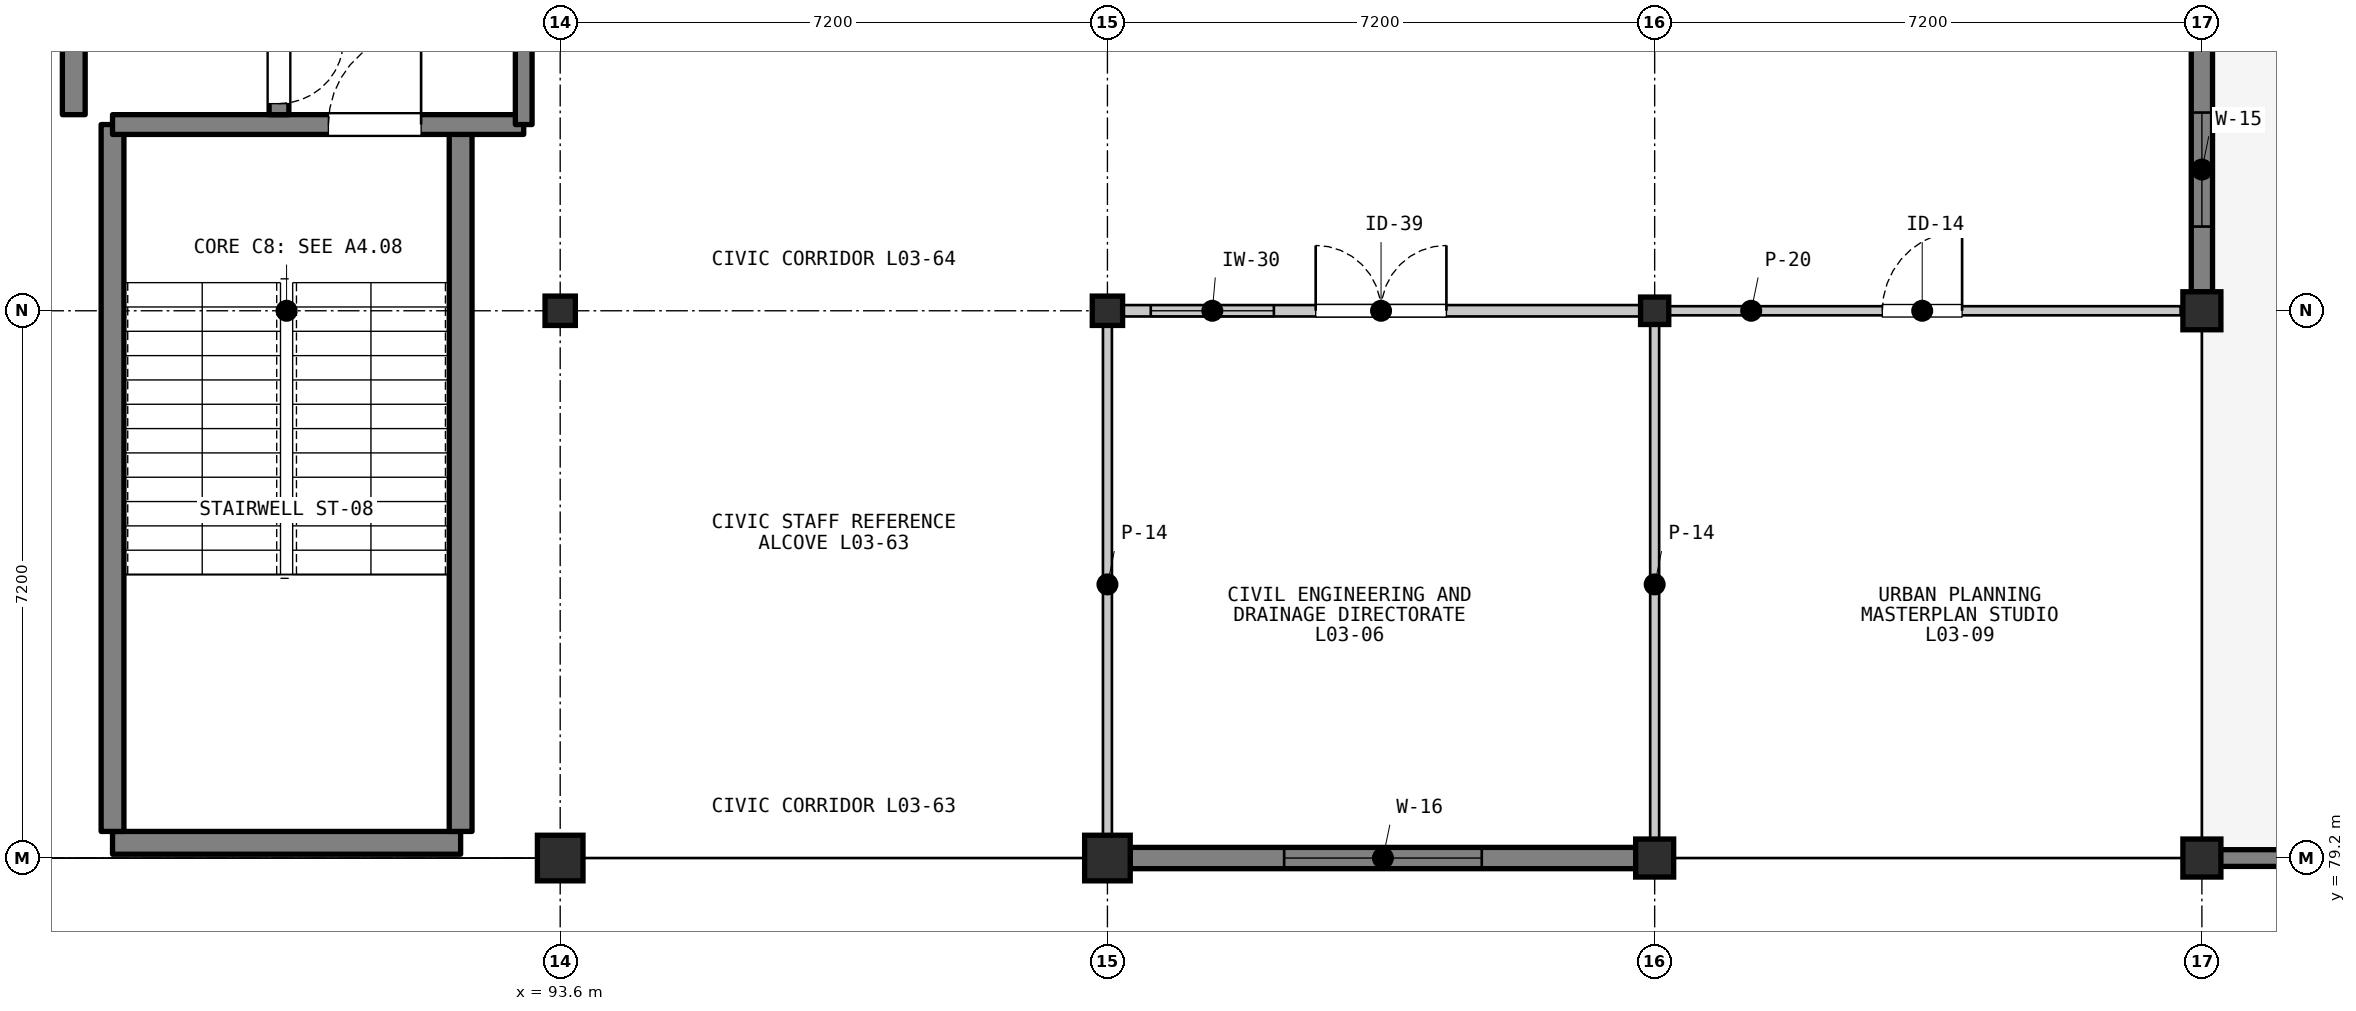
"""IFC4 building model, lengths in metres.
Left out: names, types, materials, properties, quantities, classifications, styles, units other than length and angle.
Written with IfcOpenShell. Run it as: python <this file> out.ifc"""

import sys

from ifc_helpers import new_model, si_unit, direction, frame, frame_2d, origin, origin_2d, place, context, subcontext, project, spatial, rectangle, i_section, extrude, element, fill, save


model = new_model("IFC4")
c1 = context("Model", 3, precision=1e-05, world=origin(), true_north=direction((0.0, 1.0)))
c2 = subcontext(c1, "Body", "Model", "MODEL_VIEW")
j1 = project(units=[si_unit("LENGTHUNIT", "METRE"), si_unit("PLANEANGLEUNIT", "RADIAN")], contexts=[c1])
p1 = place(None, origin())
s1 = spatial("IfcSite", under=j1, at=p1, CompositionType="ELEMENT")
p2 = place(p1, origin())
s2 = spatial("IfcBuilding", under=s1, at=p2, CompositionType="ELEMENT")
p3 = place(p2, frame((0.0, 0.0, 9.9)))
s3 = spatial("IfcBuildingStorey", under=s2, at=p3, CompositionType="ELEMENT", Elevation=9.9)
p4 = place(p3, frame((93.6, 79.2, 0.0), z_axis=(0.0, 0.0, 1.0), x_axis=(1.0, 0.0, 0.0)))
e1 = element("IfcColumn", 1, at=p4, inside=s3, PredefinedType="COLUMN", context=c2, shape_type="SweptSolid", body=[
    extrude(rectangle(XDim=0.6, YDim=0.6, at=origin_2d()), origin(), (0.0, 0.0, 1.0), 4.2),
])
p5 = place(p3, frame((93.6, 86.4, 0.0), z_axis=(0.0, 0.0, 1.0), x_axis=(1.0, 0.0, 0.0)))
e2 = element("IfcColumn", 2, at=p5, inside=s3, PredefinedType="COLUMN", context=c2, shape_type="SweptSolid", body=[
    extrude(i_section(OverallWidth=0.399, OverallDepth=0.386, WebThickness=0.021, FlangeThickness=0.033, FilletRadius=0.015, at=origin_2d()), origin(), (0.0, 0.0, 1.0), 4.2),
])
p6 = place(p3, frame((100.8, 79.2, 0.0), z_axis=(0.0, 0.0, 1.0), x_axis=(1.0, 0.0, 0.0)))
e3 = element("IfcColumn", 3, at=p6, inside=s3, PredefinedType="COLUMN", context=c2, shape_type="SweptSolid", body=[
    extrude(rectangle(XDim=0.6, YDim=0.6, at=origin_2d()), origin(), (0.0, 0.0, 1.0), 4.2),
])
p7 = place(p3, frame((100.8, 86.4, 0.0), z_axis=(0.0, 0.0, 1.0), x_axis=(1.0, 0.0, 0.0)))
e4 = element("IfcColumn", 4, at=p7, inside=s3, PredefinedType="COLUMN", context=c2, shape_type="SweptSolid", body=[
    extrude(i_section(OverallWidth=0.399, OverallDepth=0.386, WebThickness=0.021, FlangeThickness=0.033, FilletRadius=0.015, at=origin_2d()), origin(), (0.0, 0.0, 1.0), 4.2),
])
p8 = place(p3, frame((108.0, 79.2, 0.0), z_axis=(0.0, 0.0, 1.0), x_axis=(1.0, 0.0, 0.0)))
e5 = element("IfcColumn", 5, at=p8, inside=s3, PredefinedType="COLUMN", context=c2, shape_type="SweptSolid", body=[
    extrude(rectangle(XDim=0.5, YDim=0.5, at=origin_2d()), origin(), (0.0, 0.0, 1.0), 4.2),
])
p9 = place(p3, frame((108.0, 86.4, 0.0), z_axis=(0.0, 0.0, 1.0), x_axis=(1.0, 0.0, 0.0)))
e6 = element("IfcColumn", 6, at=p9, inside=s3, PredefinedType="COLUMN", context=c2, shape_type="SweptSolid", body=[
    extrude(i_section(OverallWidth=0.371, OverallDepth=0.361, WebThickness=0.012, FlangeThickness=0.02, FilletRadius=0.015, at=origin_2d()), origin(), (0.0, 0.0, 1.0), 4.2),
])
for number, where, z_axis, x_axis in (
    (7, (115.2, 79.2, 0.0), (0.0, 0.0, 1.0), (1.0, 0.0, 0.0)),
    (8, (115.2, 86.4, 0.0), (0.0, 0.0, 1.0), (1.0, 0.0, 0.0)),
):
    element("IfcColumn", number, at=place(p3, frame(where, z_axis=z_axis, x_axis=x_axis)), inside=s3, PredefinedType="COLUMN", context=c2, shape_type="SweptSolid", body=[
        extrude(rectangle(XDim=0.5, YDim=0.5, at=origin_2d()), origin(), (0.0, 0.0, 1.0), 4.2),
    ])
p10 = place(p3, frame((107.75, 79.2, 0.0), z_axis=(0.0, 0.0, 1.0), x_axis=(-1.0, 0.0, 0.0)))
e9 = element("IfcWall", 9, at=p10, inside=s3, PredefinedType="SOLIDWALL", context=c2, shape_type="SweptSolid", body=[
    extrude(rectangle(XDim=6.65, YDim=0.28, at=frame_2d((3.325, 0.0))), origin(), (0.0, 0.0, 1.0), 3.418),
])
p11 = place(p10, frame((2.025, 0.0, 0.95)))
e10 = element("IfcOpeningElement", 10, at=p11, cuts=e9, PredefinedType="OPENING", context=c2, shape_type="SweptSolid", body=[
    extrude(rectangle(XDim=2.6, YDim=1.9, at=frame_2d((1.3, 0.95))), frame((0.0, 0.15, 0.0), z_axis=(0.0, -1.0, 0.0), x_axis=(1.0, 0.0, 0.0)), (0.0, 0.0, 1.0), 0.3),
])
p12 = place(p3, frame((115.2, 93.35, 0.0), z_axis=(0.0, 0.0, 1.0), x_axis=(0.0, -1.0, 0.0)))
e11 = element("IfcWall", 11, at=p12, inside=s3, PredefinedType="SOLIDWALL", context=c2, shape_type="SweptSolid", body=[
    extrude(rectangle(XDim=6.7, YDim=0.28, at=frame_2d((3.35, 0.0))), origin(), (0.0, 0.0, 1.0), 3.467),
])
p13 = place(p12, frame((0.858, 0.0, 0.95)))
e12 = element("IfcOpeningElement", 12, at=p13, cuts=e11, PredefinedType="OPENING", context=c2, shape_type="SweptSolid", body=[
    extrude(rectangle(XDim=1.5, YDim=1.9, at=frame_2d((0.75, 0.95))), frame((0.0, 0.15, 0.0), z_axis=(0.0, -1.0, 0.0), x_axis=(1.0, 0.0, 0.0)), (0.0, 0.0, 1.0), 0.3),
])
p14 = place(p12, frame((4.342, 0.0, 0.95)))
e13 = element("IfcOpeningElement", 13, at=p14, cuts=e11, PredefinedType="OPENING", context=c2, shape_type="SweptSolid", body=[
    extrude(rectangle(XDim=1.5, YDim=1.9, at=frame_2d((0.75, 0.95))), frame((0.0, 0.15, 0.0), z_axis=(0.0, -1.0, 0.0), x_axis=(1.0, 0.0, 0.0)), (0.0, 0.0, 1.0), 0.3),
])
p15 = place(p3, frame((122.25, 79.2, 0.0), z_axis=(0.0, 0.0, 1.0), x_axis=(-1.0, 0.0, 0.0)))
e14 = element("IfcWall", 14, at=p15, inside=s3, PredefinedType="PARAPET", context=c2, shape_type="SweptSolid", body=[
    extrude(rectangle(XDim=6.9, YDim=0.22, at=frame_2d((3.45, 0.0))), origin(), (0.0, 0.0, 1.0), 0.85),
])
p16 = place(p3, frame((87.71, 79.4, 0.0), z_axis=(0.0, 0.0, 1.0), x_axis=(1.0, 0.0, 0.0)))
e15 = element("IfcWall", 15, at=p16, inside=s3, PredefinedType="SHEAR", context=c2, shape_type="SweptSolid", body=[
    extrude(rectangle(XDim=4.58, YDim=0.3, at=frame_2d((2.29, 0.0))), origin(), (0.0, 0.0, 1.0), 4.02),
])
for number, where, z_axis, x_axis in (
    (16, (87.71, 79.55, 0.0), (0.0, 0.0, 1.0), (0.0, 1.0, 0.0)),
    (17, (92.29, 79.55, 0.0), (0.0, 0.0, 1.0), (0.0, 1.0, 0.0)),
):
    element("IfcWall", number, at=place(p3, frame(where, z_axis=z_axis, x_axis=x_axis)), inside=s3, PredefinedType="SHEAR", context=c2, shape_type="SweptSolid", body=[
        extrude(rectangle(XDim=9.3, YDim=0.3, at=frame_2d((4.65, 0.0))), origin(), (0.0, 0.0, 1.0), 4.02),
    ])
p17 = place(p3, frame((87.71, 88.85, 0.0), z_axis=(0.0, 0.0, 1.0), x_axis=(1.0, 0.0, 0.0)))
e18 = element("IfcWall", 18, at=p17, inside=s3, PredefinedType="SHEAR", context=c2, shape_type="SweptSolid", body=[
    extrude(rectangle(XDim=5.41, YDim=0.26, at=frame_2d((2.705, 0.0))), origin(), (0.0, 0.0, 1.0), 4.02),
])
p18 = place(p17, frame((2.84, 0.0, 0.0)))
e19 = element("IfcOpeningElement", 19, at=p18, cuts=e18, PredefinedType="OPENING", context=c2, shape_type="SweptSolid", body=[
    extrude(rectangle(XDim=1.22, YDim=2.15, at=frame_2d((0.61, 1.075))), frame((0.0, 0.14, 0.0), z_axis=(0.0, -1.0, 0.0), x_axis=(1.0, 0.0, 0.0)), (0.0, 0.0, 1.0), 0.28),
])
p19 = place(p3, frame((87.2, 88.98, 0.0), z_axis=(0.0, 0.0, 1.0), x_axis=(0.0, 1.0, 0.0)))
e20 = element("IfcWall", 20, at=p19, inside=s3, PredefinedType="SHEAR", context=c2, shape_type="SweptSolid", body=[
    extrude(rectangle(XDim=4.32, YDim=0.3, at=frame_2d((2.16, 0.0))), origin(), (0.0, 0.0, 1.0), 4.02),
])
p20 = place(p3, frame((89.9, 93.3, 0.0), z_axis=(0.0, 0.0, 1.0), x_axis=(0.0, -1.0, 0.0)))
e21 = element("IfcWall", 21, at=p20, inside=s3, PredefinedType="SHEAR", context=c2, shape_type="SweptSolid", body=[
    extrude(rectangle(XDim=4.32, YDim=0.26, at=frame_2d((2.16, 0.0))), origin(), (0.0, 0.0, 1.0), 4.02),
])
p21 = place(p20, frame((1.0, 0.0, 0.0)))
e22 = element("IfcOpeningElement", 22, at=p21, cuts=e21, PredefinedType="OPENING", context=c2, shape_type="SweptSolid", body=[
    extrude(rectangle(XDim=1.2, YDim=2.15, at=frame_2d((0.6, 1.075))), frame((0.0, 0.14, 0.0), z_axis=(0.0, -1.0, 0.0), x_axis=(1.0, 0.0, 0.0)), (0.0, 0.0, 1.0), 0.28),
])
p22 = place(p20, frame((3.325, 0.0, 0.0)))
e23 = element("IfcOpeningElement", 23, at=p22, cuts=e21, PredefinedType="OPENING", context=c2, shape_type="SweptSolid", body=[
    extrude(rectangle(XDim=0.85, YDim=2.05, at=frame_2d((0.425, 1.025))), frame((0.0, 0.14, 0.0), z_axis=(0.0, -1.0, 0.0), x_axis=(1.0, 0.0, 0.0)), (0.0, 0.0, 1.0), 0.28),
])
p23 = place(p3, frame((93.12, 93.3, 0.0), z_axis=(0.0, 0.0, 1.0), x_axis=(0.0, -1.0, 0.0)))
e24 = element("IfcWall", 24, at=p23, inside=s3, PredefinedType="SHEAR", context=c2, shape_type="SweptSolid", body=[
    extrude(rectangle(XDim=4.45, YDim=0.22, at=frame_2d((2.225, 0.0))), origin(), (0.0, 0.0, 1.0), 4.02),
])
p24 = place(p23, frame((1.55, 0.0, 0.0)))
e25 = element("IfcOpeningElement", 25, at=p24, cuts=e24, PredefinedType="OPENING", context=c2, shape_type="SweptSolid", body=[
    extrude(rectangle(XDim=1.6, YDim=2.2, at=frame_2d((0.8, 1.1))), frame((0.0, 0.12, 0.0), z_axis=(0.0, -1.0, 0.0), x_axis=(1.0, 0.0, 0.0)), (0.0, 0.0, 1.0), 0.24),
])
p25 = place(p3, frame((100.92, 86.4, 0.0), z_axis=(0.0, 0.0, 1.0), x_axis=(1.0, 0.0, 0.0)))
e26 = element("IfcWall", 26, at=p25, inside=s3, PredefinedType="PARTITIONING", context=c2, shape_type="SweptSolid", body=[
    extrude(rectangle(XDim=6.96, YDim=0.15, at=frame_2d((3.48, 0.0))), origin(), (0.0, 0.0, 1.0), 3.408),
])
p26 = place(p25, frame((2.62, 0.0, 0.0)))
e27 = element("IfcOpeningElement", 27, at=p26, cuts=e26, PredefinedType="OPENING", context=c2, shape_type="SweptSolid", body=[
    extrude(rectangle(XDim=1.72, YDim=2.32, at=frame_2d((0.86, 1.16))), frame((0.0, 0.085, 0.0), z_axis=(0.0, -1.0, 0.0), x_axis=(1.0, 0.0, 0.0)), (0.0, 0.0, 1.0), 0.17),
])
p27 = place(p25, frame((0.45, 0.0, 1.05)))
e28 = element("IfcOpeningElement", 28, at=p27, cuts=e26, PredefinedType="OPENING", context=c2, shape_type="SweptSolid", body=[
    extrude(rectangle(XDim=1.62, YDim=0.96, at=frame_2d((0.81, 0.48))), frame((0.0, 0.085, 0.0), z_axis=(0.0, -1.0, 0.0), x_axis=(1.0, 0.0, 0.0)), (0.0, 0.0, 1.0), 0.17),
])
p28 = place(p3, frame((100.8, 79.32, 0.0), z_axis=(0.0, 0.0, 1.0), x_axis=(0.0, 1.0, 0.0)))
e29 = element("IfcWall", 29, at=p28, inside=s3, PredefinedType="PARTITIONING", context=c2, shape_type="SweptSolid", body=[
    extrude(rectangle(XDim=6.96, YDim=0.118, at=frame_2d((3.48, 0.0))), origin(), (0.0, 0.0, 1.0), 3.408),
])
p29 = place(p3, frame((108.0, 86.28, 0.0), z_axis=(0.0, 0.0, 1.0), x_axis=(0.0, -1.0, 0.0)))
e30 = element("IfcWall", 30, at=p29, inside=s3, PredefinedType="PARTITIONING", context=c2, shape_type="SweptSolid", body=[
    extrude(rectangle(XDim=6.96, YDim=0.118, at=frame_2d((3.48, 0.0))), origin(), (0.0, 0.0, 1.0), 3.388),
])
p30 = place(p3, frame((108.12, 86.4, 0.0), z_axis=(0.0, 0.0, 1.0), x_axis=(1.0, 0.0, 0.0)))
e31 = element("IfcWall", 31, at=p30, inside=s3, PredefinedType="PARTITIONING", context=c2, shape_type="SweptSolid", body=[
    extrude(rectangle(XDim=6.8, YDim=0.12, at=frame_2d((3.4, 0.0))), origin(), (0.0, 0.0, 1.0), 3.388),
])
p31 = place(p30, frame((2.875, 0.0, 0.0)))
e32 = element("IfcOpeningElement", 32, at=p31, cuts=e31, PredefinedType="OPENING", context=c2, shape_type="SweptSolid", body=[
    extrude(rectangle(XDim=1.05, YDim=2.15, at=frame_2d((0.525, 1.075))), frame((0.0, 0.07, 0.0), z_axis=(0.0, -1.0, 0.0), x_axis=(1.0, 0.0, 0.0)), (0.0, 0.0, 1.0), 0.14),
])
p32 = place(p11, origin())
e33 = element("IfcWindow", 33, at=p32, inside=s3, PartitioningType="SINGLE_PANEL", PredefinedType="WINDOW", context=c2, shape_type="SweptSolid", body=[
    extrude(rectangle(XDim=2.6, YDim=1.9, at=frame_2d((1.3, 0.95))), frame((0.0, 0.03, 0.0), z_axis=(0.0, -1.0, 0.0), x_axis=(1.0, 0.0, 0.0)), (0.0, 0.0, 1.0), 0.06),
])
fill(e10, e33)
p33 = place(p14, origin())
e34 = element("IfcWindow", 34, at=p33, inside=s3, PartitioningType="SINGLE_PANEL", PredefinedType="WINDOW", context=c2, shape_type="SweptSolid", body=[
    extrude(rectangle(XDim=1.5, YDim=1.9, at=frame_2d((0.75, 0.95))), frame((0.0, 0.03, 0.0), z_axis=(0.0, -1.0, 0.0), x_axis=(1.0, 0.0, 0.0)), (0.0, 0.0, 1.0), 0.06),
])
fill(e13, e34)
p34 = place(p18, origin())
e35 = element("IfcDoor", 35, at=p34, inside=s3, OperationType="SINGLE_SWING_RIGHT", PredefinedType="DOOR", context=c2, shape_type="SweptSolid", body=[
    extrude(rectangle(XDim=1.22, YDim=2.15, at=frame_2d((0.61, 1.075))), frame((0.0, 0.025, 0.0), z_axis=(0.0, -1.0, 0.0), x_axis=(1.0, 0.0, 0.0)), (0.0, 0.0, 1.0), 0.05),
])
fill(e19, e35)
p35 = place(p22, origin())
e36 = element("IfcDoor", 36, at=p35, inside=s3, OperationType="SINGLE_SWING_LEFT", PredefinedType="DOOR", context=c2, shape_type="SweptSolid", body=[
    extrude(rectangle(XDim=0.85, YDim=2.05, at=frame_2d((0.425, 1.025))), frame((0.0, 0.025, 0.0), z_axis=(0.0, -1.0, 0.0), x_axis=(1.0, 0.0, 0.0)), (0.0, 0.0, 1.0), 0.05),
])
fill(e23, e36)
p36 = place(p26, origin())
e37 = element("IfcDoor", 37, at=p36, inside=s3, OperationType="DOUBLE_DOOR_SINGLE_SWING", PredefinedType="DOOR", context=c2, shape_type="SweptSolid", body=[
    extrude(rectangle(XDim=1.72, YDim=2.32, at=frame_2d((0.86, 1.16))), frame((0.0, 0.025, 0.0), z_axis=(0.0, -1.0, 0.0), x_axis=(1.0, 0.0, 0.0)), (0.0, 0.0, 1.0), 0.05),
])
fill(e27, e37)
p37 = place(p27, origin())
e38 = element("IfcWindow", 38, at=p37, inside=s3, PartitioningType="SINGLE_PANEL", PredefinedType="WINDOW", context=c2, shape_type="SweptSolid", body=[
    extrude(rectangle(XDim=1.62, YDim=0.96, at=frame_2d((0.81, 0.48))), frame((0.0, 0.03, 0.0), z_axis=(0.0, -1.0, 0.0), x_axis=(1.0, 0.0, 0.0)), (0.0, 0.0, 1.0), 0.06),
])
fill(e28, e38)
p38 = place(p31, origin())
e39 = element("IfcDoor", 39, at=p38, inside=s3, OperationType="SINGLE_SWING_RIGHT", PredefinedType="DOOR", context=c2, shape_type="SweptSolid", body=[
    extrude(rectangle(XDim=1.05, YDim=2.15, at=frame_2d((0.525, 1.075))), frame((0.0, 0.025, 0.0), z_axis=(0.0, -1.0, 0.0), x_axis=(1.0, 0.0, 0.0)), (0.0, 0.0, 1.0), 0.05),
])
fill(e32, e39)
save(model, sys.argv[1])
